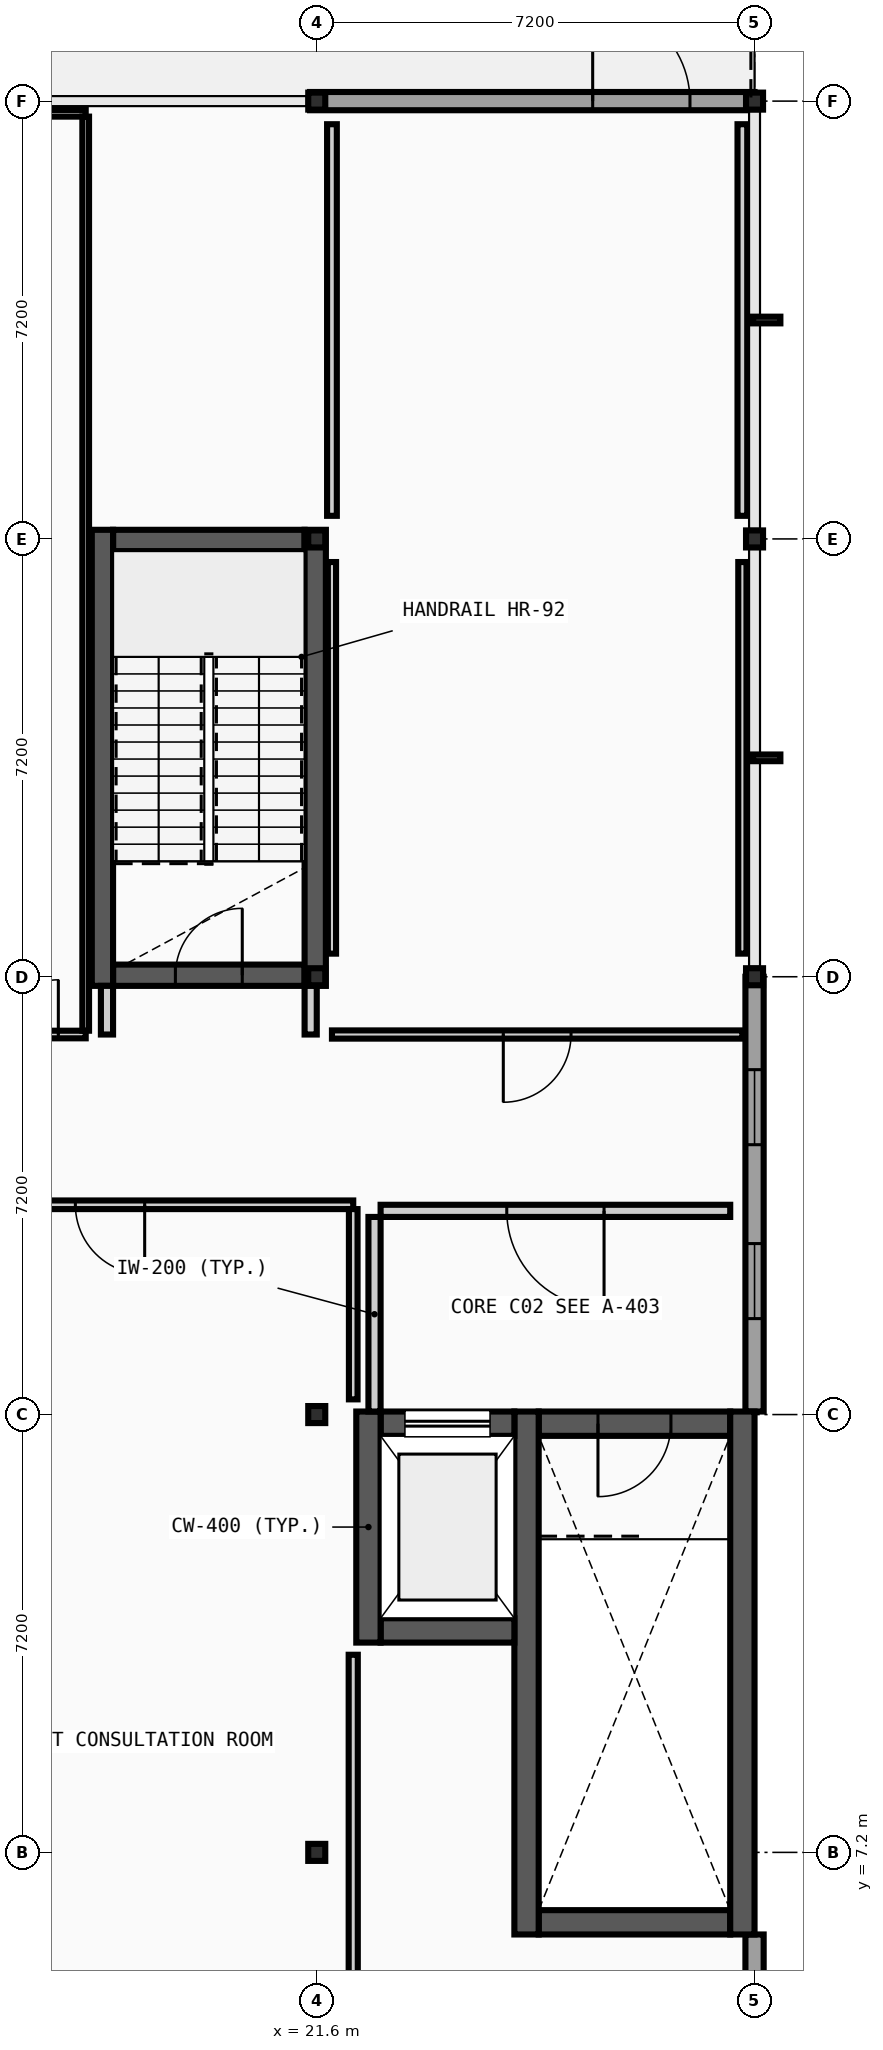
"""IFC4 building model, lengths in metres.
Left out: names, types, materials, properties, quantities, classifications, styles, units other than length and angle.
Written with IfcOpenShell. Run it as: python <this file> out.ifc"""

import sys

from ifc_helpers import new_model, si_unit, direction, frame, frame_2d, origin, origin_2d, place, context, subcontext, project, spatial, rectangle, i_section, extrude, element, fill, save


model = new_model("IFC4")
c1 = context("Model", 3, precision=1e-05, world=origin(), true_north=direction((0.0, 1.0)))
c2 = subcontext(c1, "Body", "Model", "MODEL_VIEW")
j1 = project(units=[si_unit("LENGTHUNIT", "METRE"), si_unit("PLANEANGLEUNIT", "RADIAN")], contexts=[c1])
p1 = place(None, origin())
s1 = spatial("IfcSite", under=j1, at=p1, CompositionType="ELEMENT")
p2 = place(p1, origin())
s2 = spatial("IfcBuilding", under=s1, at=p2, CompositionType="ELEMENT")
p3 = place(p2, frame((0.0, 0.0, 27.2)))
s3 = spatial("IfcBuildingStorey", under=s2, at=p3, CompositionType="ELEMENT", Elevation=27.2)
for number, where, z_axis, x_axis in (
    (1, (21.6, 7.2, 0.0), (0.0, 0.0, 1.0), (1.0, 0.0, 0.0)),
    (2, (21.6, 14.4, 0.0), (0.0, 0.0, 1.0), (1.0, 0.0, 0.0)),
    (3, (21.6, 21.6, 0.0), (0.0, 0.0, 1.0), (1.0, 0.0, 0.0)),
    (4, (21.6, 28.8, 0.0), (0.0, 0.0, 1.0), (1.0, 0.0, 0.0)),
    (5, (21.6, 36.0, 0.0), (0.0, 0.0, 1.0), (1.0, 0.0, 0.0)),
    (6, (28.8, 21.6, 0.0), (0.0, 0.0, 1.0), (1.0, 0.0, 0.0)),
    (7, (28.8, 28.8, 0.0), (0.0, 0.0, 1.0), (1.0, 0.0, 0.0)),
    (8, (28.8, 36.0, 0.0), (0.0, 0.0, 1.0), (1.0, 0.0, 0.0)),
):
    element("IfcColumn", number, at=place(p3, frame(where, z_axis=z_axis, x_axis=x_axis)), inside=s3, PredefinedType="COLUMN", context=c2, shape_type="SweptSolid", body=[
        extrude(i_section(OverallWidth=0.28, OverallDepth=0.28, WebThickness=0.01, FlangeThickness=0.018, FilletRadius=0.024, at=origin_2d()), origin(), (0.0, 0.0, 1.0), 4.4),
    ])
p4 = place(p3, frame((28.8, 36.0, 0.0), z_axis=(0.0, 0.0, 1.0), x_axis=(-1.0, 0.0, 0.0)))
e9 = element("IfcWall", 9, at=p4, inside=s3, PredefinedType="STANDARD", context=c2, shape_type="SweptSolid", body=[
    extrude(rectangle(XDim=7.31, YDim=0.3, at=frame_2d((3.655, 0.0))), origin(), (0.0, 0.0, 1.0), 4.035),
])
p5 = place(p4, frame((1.062, 0.0, 0.0)))
e10 = element("IfcOpeningElement", 10, at=p5, cuts=e9, PredefinedType="OPENING", context=c2, shape_type="SweptSolid", body=[
    extrude(rectangle(XDim=1.6, YDim=2.2, at=frame_2d((0.8, 1.1))), frame((0.0, 0.16, 0.0), z_axis=(0.0, -1.0, 0.0), x_axis=(1.0, 0.0, 0.0)), (0.0, 0.0, 1.0), 0.32),
])
p6 = place(p3, frame((28.8, -0.15, 0.0), z_axis=(0.0, 0.0, 1.0), x_axis=(0.0, 1.0, 0.0)))
e11 = element("IfcWall", 11, at=p6, inside=s3, PredefinedType="STANDARD", context=c2, shape_type="SweptSolid", body=[
    extrude(rectangle(XDim=6.0, YDim=0.3, at=frame_2d((3.0, 0.0))), origin(), (0.0, 0.0, 1.0), 4.18),
])
p7 = place(p6, frame((2.4, 0.0, 0.95)))
e12 = element("IfcOpeningElement", 12, at=p7, cuts=e11, PredefinedType="OPENING", context=c2, shape_type="SweptSolid", body=[
    extrude(rectangle(XDim=1.2, YDim=1.26, at=frame_2d((0.6, 0.63))), frame((0.0, 0.16, 0.0), z_axis=(0.0, -1.0, 0.0), x_axis=(1.0, 0.0, 0.0)), (0.0, 0.0, 1.0), 0.32),
])
p8 = place(p3, frame((28.8, 14.45, 0.0), z_axis=(0.0, 0.0, 1.0), x_axis=(0.0, 1.0, 0.0)))
e13 = element("IfcWall", 13, at=p8, inside=s3, PredefinedType="STANDARD", context=c2, shape_type="SweptSolid", body=[
    extrude(rectangle(XDim=7.15, YDim=0.3, at=frame_2d((3.575, 0.0))), origin(), (0.0, 0.0, 1.0), 4.18),
])
p9 = place(p8, frame((1.528, 0.0, 0.95)))
e14 = element("IfcOpeningElement", 14, at=p9, cuts=e13, PredefinedType="OPENING", context=c2, shape_type="SweptSolid", body=[
    extrude(rectangle(XDim=1.234, YDim=1.26, at=frame_2d((0.617, 0.63))), frame((0.0, 0.16, 0.0), z_axis=(0.0, -1.0, 0.0), x_axis=(1.0, 0.0, 0.0)), (0.0, 0.0, 1.0), 0.32),
])
p10 = place(p8, frame((4.388, 0.0, 0.95)))
e15 = element("IfcOpeningElement", 15, at=p10, cuts=e13, PredefinedType="OPENING", context=c2, shape_type="SweptSolid", body=[
    extrude(rectangle(XDim=1.234, YDim=1.26, at=frame_2d((0.617, 0.63))), frame((0.0, 0.16, 0.0), z_axis=(0.0, -1.0, 0.0), x_axis=(1.0, 0.0, 0.0)), (0.0, 0.0, 1.0), 0.32),
])
p11 = place(p3, frame((25.25, 6.05, 0.0), z_axis=(0.0, 0.0, 1.0), x_axis=(1.0, 0.0, 0.0)))
e16 = element("IfcWall", 16, at=p11, inside=s3, PredefinedType="SHEAR", context=c2, shape_type="SweptSolid", body=[
    extrude(rectangle(XDim=3.15, YDim=0.4, at=frame_2d((1.575, 0.0))), origin(), (0.0, 0.0, 1.0), 4.18),
])
p12 = place(p3, frame((25.25, 14.25, 0.0), z_axis=(0.0, 0.0, 1.0), x_axis=(1.0, 0.0, 0.0)))
e17 = element("IfcWall", 17, at=p12, inside=s3, PredefinedType="SHEAR", context=c2, shape_type="SweptSolid", body=[
    extrude(rectangle(XDim=3.15, YDim=0.4, at=frame_2d((1.575, 0.0))), origin(), (0.0, 0.0, 1.0), 4.18),
])
p13 = place(p12, frame((0.975, 0.0, 0.0)))
e18 = element("IfcOpeningElement", 18, at=p13, cuts=e17, PredefinedType="OPENING", context=c2, shape_type="SweptSolid", body=[
    extrude(rectangle(XDim=1.2, YDim=2.15, at=frame_2d((0.6, 1.075))), frame((0.0, 0.21, 0.0), z_axis=(0.0, -1.0, 0.0), x_axis=(1.0, 0.0, 0.0)), (0.0, 0.0, 1.0), 0.42),
])
for number, where, z_axis, x_axis in (
    (19, (25.05, 5.85, 0.0), (0.0, 0.0, 1.0), (0.0, 1.0, 0.0)),
    (20, (28.6, 5.85, 0.0), (0.0, 0.0, 1.0), (0.0, 1.0, 0.0)),
):
    element("IfcWall", number, at=place(p3, frame(where, z_axis=z_axis, x_axis=x_axis)), inside=s3, PredefinedType="SHEAR", context=c2, shape_type="SweptSolid", body=[
        extrude(rectangle(XDim=8.6, YDim=0.4, at=frame_2d((4.3, 0.0))), origin(), (0.0, 0.0, 1.0), 4.18),
    ])
p14 = place(p3, frame((22.65, 10.85, 0.0), z_axis=(0.0, 0.0, 1.0), x_axis=(1.0, 0.0, 0.0)))
e21 = element("IfcWall", 21, at=p14, inside=s3, PredefinedType="SHEAR", context=c2, shape_type="SweptSolid", body=[
    extrude(rectangle(XDim=2.2, YDim=0.4, at=frame_2d((1.1, 0.0))), origin(), (0.0, 0.0, 1.0), 4.18),
])
p15 = place(p3, frame((22.65, 14.25, 0.0), z_axis=(0.0, 0.0, 1.0), x_axis=(1.0, 0.0, 0.0)))
e22 = element("IfcWall", 22, at=p15, inside=s3, PredefinedType="SHEAR", context=c2, shape_type="SweptSolid", body=[
    extrude(rectangle(XDim=2.2, YDim=0.4, at=frame_2d((1.1, 0.0))), origin(), (0.0, 0.0, 1.0), 4.18),
])
p16 = place(p15, frame((0.4, 0.0, 0.0)))
e23 = element("IfcOpeningElement", 23, at=p16, cuts=e22, PredefinedType="OPENING", context=c2, shape_type="SweptSolid", body=[
    extrude(rectangle(XDim=1.4, YDim=2.2, at=frame_2d((0.7, 1.1))), frame((0.0, 0.21, 0.0), z_axis=(0.0, -1.0, 0.0), x_axis=(1.0, 0.0, 0.0)), (0.0, 0.0, 1.0), 0.42),
])
p17 = place(p3, frame((22.45, 10.65, 0.0), z_axis=(0.0, 0.0, 1.0), x_axis=(0.0, 1.0, 0.0)))
e24 = element("IfcWall", 24, at=p17, inside=s3, PredefinedType="SHEAR", context=c2, shape_type="SweptSolid", body=[
    extrude(rectangle(XDim=3.8, YDim=0.4, at=frame_2d((1.9, 0.0))), origin(), (0.0, 0.0, 1.0), 4.18),
])
p18 = place(p3, frame((22.65, 17.75, 0.0), z_axis=(0.0, 0.0, 1.0), x_axis=(1.0, 0.0, 0.0)))
e25 = element("IfcWall", 25, at=p18, inside=s3, PredefinedType="PARTITIONING", context=c2, shape_type="SweptSolid", body=[
    extrude(rectangle(XDim=5.75, YDim=0.2, at=frame_2d((2.875, 0.0))), origin(), (0.0, 0.0, 1.0), 4.18),
])
p19 = place(p18, frame((2.075, 0.0, 0.0)))
e26 = element("IfcOpeningElement", 26, at=p19, cuts=e25, PredefinedType="OPENING", context=c2, shape_type="SweptSolid", body=[
    extrude(rectangle(XDim=1.6, YDim=2.2, at=frame_2d((0.8, 1.1))), frame((0.0, 0.11, 0.0), z_axis=(0.0, -1.0, 0.0), x_axis=(1.0, 0.0, 0.0)), (0.0, 0.0, 1.0), 0.22),
])
p20 = place(p3, frame((22.55, 14.45, 0.0), z_axis=(0.0, 0.0, 1.0), x_axis=(0.0, 1.0, 0.0)))
e27 = element("IfcWall", 27, at=p20, inside=s3, PredefinedType="PARTITIONING", context=c2, shape_type="SweptSolid", body=[
    extrude(rectangle(XDim=3.2, YDim=0.2, at=frame_2d((1.6, 0.0))), origin(), (0.0, 0.0, 1.0), 4.18),
])
p21 = place(p3, frame((18.25, 21.625, 0.0), z_axis=(0.0, 0.0, 1.0), x_axis=(1.0, 0.0, 0.0)))
e28 = element("IfcWall", 28, at=p21, inside=s3, PredefinedType="SHEAR", context=c2, shape_type="SweptSolid", body=[
    extrude(rectangle(XDim=3.15, YDim=0.35, at=frame_2d((1.575, 0.0))), origin(), (0.0, 0.0, 1.0), 4.2),
])
p22 = place(p21, frame((1.025, 0.0, 0.0)))
e29 = element("IfcOpeningElement", 29, at=p22, cuts=e28, PredefinedType="OPENING", context=c2, shape_type="SweptSolid", body=[
    extrude(rectangle(XDim=1.1, YDim=2.15, at=frame_2d((0.55, 1.075))), frame((0.0, 0.185, 0.0), z_axis=(0.0, -1.0, 0.0), x_axis=(1.0, 0.0, 0.0)), (0.0, 0.0, 1.0), 0.37),
])
p23 = place(p3, frame((18.25, 28.775, 0.0), z_axis=(0.0, 0.0, 1.0), x_axis=(1.0, 0.0, 0.0)))
e30 = element("IfcWall", 30, at=p23, inside=s3, PredefinedType="SHEAR", context=c2, shape_type="SweptSolid", body=[
    extrude(rectangle(XDim=3.15, YDim=0.35, at=frame_2d((1.575, 0.0))), origin(), (0.0, 0.0, 1.0), 4.2),
])
for number, where, z_axis, x_axis in (
    (31, (18.075, 21.45, 0.0), (0.0, 0.0, 1.0), (0.0, 1.0, 0.0)),
    (32, (21.575, 21.45, 0.0), (0.0, 0.0, 1.0), (0.0, 1.0, 0.0)),
):
    element("IfcWall", number, at=place(p3, frame(where, z_axis=z_axis, x_axis=x_axis)), inside=s3, PredefinedType="SHEAR", context=c2, shape_type="SweptSolid", body=[
        extrude(rectangle(XDim=7.5, YDim=0.35, at=frame_2d((3.75, 0.0))), origin(), (0.0, 0.0, 1.0), 4.2),
    ])
for number, where, z_axis, x_axis in (
    (33, (18.15, 20.65, 0.0), (0.0, 0.0, 1.0), (0.0, 1.0, 0.0)),
    (34, (21.5, 20.65, 0.0), (0.0, 0.0, 1.0), (0.0, 1.0, 0.0)),
):
    element("IfcWall", number, at=place(p3, frame(where, z_axis=z_axis, x_axis=x_axis)), inside=s3, PredefinedType="PARTITIONING", context=c2, shape_type="SweptSolid", body=[
        extrude(rectangle(XDim=0.8, YDim=0.2, at=frame_2d((0.4, 0.0))), origin(), (0.0, 0.0, 1.0), 3.85),
    ])
p24 = place(p3, frame((9.45, 17.85, 0.0), z_axis=(0.0, 0.0, 1.0), x_axis=(1.0, 0.0, 0.0)))
e35 = element("IfcWall", 35, at=p24, inside=s3, PredefinedType="PARTITIONING", context=c2, shape_type="SweptSolid", body=[
    extrude(rectangle(XDim=12.75, YDim=0.142, at=frame_2d((6.375, 0.0))), origin(), (0.0, 0.0, 1.0), 4.18),
])
p25 = place(p24, frame((0.45, 0.0, 0.0)))
e36 = element("IfcOpeningElement", 36, at=p25, cuts=e35, PredefinedType="OPENING", context=c2, shape_type="SweptSolid", body=[
    extrude(rectangle(XDim=1.8, YDim=2.3, at=frame_2d((0.9, 1.15))), frame((0.0, 0.081, 0.0), z_axis=(0.0, -1.0, 0.0), x_axis=(1.0, 0.0, 0.0)), (0.0, 0.0, 1.0), 0.162),
])
p26 = place(p24, frame((8.18, 0.0, 0.0)))
e37 = element("IfcOpeningElement", 37, at=p26, cuts=e35, PredefinedType="OPENING", context=c2, shape_type="SweptSolid", body=[
    extrude(rectangle(XDim=1.14, YDim=2.096, at=frame_2d((0.57, 1.048))), frame((0.0, 0.081, 0.0), z_axis=(0.0, -1.0, 0.0), x_axis=(1.0, 0.0, 0.0)), (0.0, 0.0, 1.0), 0.162),
])
p27 = place(p3, frame((14.7, 20.65, 0.0), z_axis=(0.0, 0.0, 1.0), x_axis=(1.0, 0.0, 0.0)))
e38 = element("IfcWall", 38, at=p27, inside=s3, PredefinedType="PARTITIONING", context=c2, shape_type="SweptSolid", body=[
    extrude(rectangle(XDim=3.1, YDim=0.125, at=frame_2d((1.55, 0.0))), origin(), (0.0, 0.0, 1.0), 4.18),
])
p28 = place(p27, frame((1.75, 0.0, 0.0)))
e39 = element("IfcOpeningElement", 39, at=p28, cuts=e38, PredefinedType="OPENING", context=c2, shape_type="SweptSolid", body=[
    extrude(rectangle(XDim=0.9, YDim=2.1, at=frame_2d((0.45, 1.05))), frame((0.0, 0.073, 0.0), z_axis=(0.0, -1.0, 0.0), x_axis=(1.0, 0.0, 0.0)), (0.0, 0.0, 1.0), 0.145),
])
p29 = place(p3, frame((21.85, 20.65, 0.0), z_axis=(0.0, 0.0, 1.0), x_axis=(1.0, 0.0, 0.0)))
e40 = element("IfcWall", 40, at=p29, inside=s3, PredefinedType="PARTITIONING", context=c2, shape_type="SweptSolid", body=[
    extrude(rectangle(XDim=6.75, YDim=0.135, at=frame_2d((3.375, 0.0))), origin(), (0.0, 0.0, 1.0), 4.18),
])
p30 = place(p29, frame((2.818, 0.0, 0.0)))
e41 = element("IfcOpeningElement", 41, at=p30, cuts=e40, PredefinedType="OPENING", context=c2, shape_type="SweptSolid", body=[
    extrude(rectangle(XDim=1.114, YDim=2.096, at=frame_2d((0.557, 1.048))), frame((0.0, 0.078, 0.0), z_axis=(0.0, -1.0, 0.0), x_axis=(1.0, 0.0, 0.0)), (0.0, 0.0, 1.0), 0.155),
])
p31 = place(p3, frame((14.78, 35.8, 0.0), z_axis=(0.0, 0.0, 1.0), x_axis=(1.0, 0.0, 0.0)))
e42 = element("IfcWall", 42, at=p31, inside=s3, PredefinedType="PARTITIONING", context=c2, shape_type="SweptSolid", body=[
    extrude(rectangle(XDim=3.02, YDim=0.11, at=frame_2d((1.51, 0.0))), origin(), (0.0, 0.0, 1.0), 4.035),
])
p32 = place(p3, frame((17.8, 20.712, 0.0), z_axis=(0.0, 0.0, 1.0), x_axis=(0.0, 1.0, 0.0)))
e43 = element("IfcWall", 43, at=p32, inside=s3, PredefinedType="PARTITIONING", context=c2, shape_type="SweptSolid", body=[
    extrude(rectangle(XDim=15.033, YDim=0.11, at=frame_2d((7.516, 0.0))), origin(), (0.0, 0.0, 1.0), 4.18),
])
p33 = place(p3, frame((21.85, 21.98, 0.0), z_axis=(0.0, 0.0, 1.0), x_axis=(0.0, 1.0, 0.0)))
e44 = element("IfcWall", 44, at=p33, inside=s3, PredefinedType="PARTITIONING", context=c2, shape_type="SweptSolid", body=[
    extrude(rectangle(XDim=6.44, YDim=0.135, at=frame_2d((3.22, 0.0))), origin(), (0.0, 0.0, 1.0), 4.18),
])
p34 = place(p3, frame((21.85, 29.18, 0.0), z_axis=(0.0, 0.0, 1.0), x_axis=(0.0, 1.0, 0.0)))
e45 = element("IfcWall", 45, at=p34, inside=s3, PredefinedType="PARTITIONING", context=c2, shape_type="SweptSolid", body=[
    extrude(rectangle(XDim=6.44, YDim=0.16, at=frame_2d((3.22, 0.0))), origin(), (0.0, 0.0, 1.0), 4.18),
])
p35 = place(p3, frame((22.2, 0.2, 0.0), z_axis=(0.0, 0.0, 1.0), x_axis=(0.0, 1.0, 0.0)))
e46 = element("IfcWall", 46, at=p35, inside=s3, PredefinedType="PARTITIONING", context=c2, shape_type="SweptSolid", body=[
    extrude(rectangle(XDim=10.25, YDim=0.15, at=frame_2d((5.125, 0.0))), origin(), (0.0, 0.0, 1.0), 4.18),
])
p36 = place(p3, frame((22.2, 14.65, 0.0), z_axis=(0.0, 0.0, 1.0), x_axis=(0.0, 1.0, 0.0)))
e47 = element("IfcWall", 47, at=p36, inside=s3, PredefinedType="PARTITIONING", context=c2, shape_type="SweptSolid", body=[
    extrude(rectangle(XDim=3.129, YDim=0.142, at=frame_2d((1.564, 0.0))), origin(), (0.0, 0.0, 1.0), 4.18),
])
p37 = place(p3, frame((28.6, 21.98, 0.0), z_axis=(0.0, 0.0, 1.0), x_axis=(0.0, 1.0, 0.0)))
e48 = element("IfcWall", 48, at=p37, inside=s3, PredefinedType="PARTITIONING", context=c2, shape_type="SweptSolid", body=[
    extrude(rectangle(XDim=6.44, YDim=0.135, at=frame_2d((3.22, 0.0))), origin(), (0.0, 0.0, 1.0), 4.11),
])
p38 = place(p3, frame((28.6, 29.18, 0.0), z_axis=(0.0, 0.0, 1.0), x_axis=(0.0, 1.0, 0.0)))
e49 = element("IfcWall", 49, at=p38, inside=s3, PredefinedType="PARTITIONING", context=c2, shape_type="SweptSolid", body=[
    extrude(rectangle(XDim=6.44, YDim=0.16, at=frame_2d((3.22, 0.0))), origin(), (0.0, 0.0, 1.0), 4.11),
])
p39 = place(p9, origin())
e50 = element("IfcWindow", 50, at=p39, inside=s3, PartitioningType="SINGLE_PANEL", PredefinedType="WINDOW", context=c2, shape_type="SweptSolid", body=[
    extrude(rectangle(XDim=1.234, YDim=1.26, at=frame_2d((0.617, 0.63))), frame((0.0, 0.03, 0.0), z_axis=(0.0, -1.0, 0.0), x_axis=(1.0, 0.0, 0.0)), (0.0, 0.0, 1.0), 0.06),
])
fill(e14, e50)
p40 = place(p10, origin())
e51 = element("IfcWindow", 51, at=p40, inside=s3, PartitioningType="SINGLE_PANEL", PredefinedType="WINDOW", context=c2, shape_type="SweptSolid", body=[
    extrude(rectangle(XDim=1.234, YDim=1.26, at=frame_2d((0.617, 0.63))), frame((0.0, 0.03, 0.0), z_axis=(0.0, -1.0, 0.0), x_axis=(1.0, 0.0, 0.0)), (0.0, 0.0, 1.0), 0.06),
])
fill(e15, e51)
p41 = place(p5, origin())
e52 = element("IfcDoor", 52, at=p41, inside=s3, OperationType="DOUBLE_DOOR_SINGLE_SWING", PredefinedType="DOOR", context=c2, shape_type="SweptSolid", body=[
    extrude(rectangle(XDim=1.6, YDim=2.2, at=frame_2d((0.8, 1.1))), frame((0.0, 0.025, 0.0), z_axis=(0.0, -1.0, 0.0), x_axis=(1.0, 0.0, 0.0)), (0.0, 0.0, 1.0), 0.05),
])
fill(e10, e52)
p42 = place(p13, frame((1.2, 0.0, 0.0), z_axis=(0.0, 0.0, 1.0), x_axis=(-1.0, 0.0, 0.0)))
e53 = element("IfcDoor", 53, at=p42, inside=s3, OperationType="SINGLE_SWING_LEFT", PredefinedType="DOOR", context=c2, shape_type="SweptSolid", body=[
    extrude(rectangle(XDim=1.2, YDim=2.15, at=frame_2d((0.6, 1.075))), frame((0.0, 0.025, 0.0), z_axis=(0.0, -1.0, 0.0), x_axis=(1.0, 0.0, 0.0)), (0.0, 0.0, 1.0), 0.05),
])
fill(e18, e53)
p43 = place(p16, origin())
e54 = element("IfcDoor", 54, at=p43, inside=s3, OperationType="SLIDING_TO_LEFT", PredefinedType="DOOR", context=c2, shape_type="SweptSolid", body=[
    extrude(rectangle(XDim=1.4, YDim=2.2, at=frame_2d((0.7, 1.1))), frame((0.0, 0.025, 0.0), z_axis=(0.0, -1.0, 0.0), x_axis=(1.0, 0.0, 0.0)), (0.0, 0.0, 1.0), 0.05),
])
fill(e23, e54)
p44 = place(p19, origin())
e55 = element("IfcDoor", 55, at=p44, inside=s3, OperationType="DOUBLE_DOOR_SINGLE_SWING", PredefinedType="DOOR", context=c2, shape_type="SweptSolid", body=[
    extrude(rectangle(XDim=1.6, YDim=2.2, at=frame_2d((0.8, 1.1))), frame((0.0, 0.025, 0.0), z_axis=(0.0, -1.0, 0.0), x_axis=(1.0, 0.0, 0.0)), (0.0, 0.0, 1.0), 0.05),
])
fill(e26, e55)
p45 = place(p22, frame((1.1, 0.0, 0.0), z_axis=(0.0, 0.0, 1.0), x_axis=(-1.0, 0.0, 0.0)))
e56 = element("IfcDoor", 56, at=p45, inside=s3, OperationType="SINGLE_SWING_RIGHT", PredefinedType="DOOR", context=c2, shape_type="SweptSolid", body=[
    extrude(rectangle(XDim=1.1, YDim=2.15, at=frame_2d((0.55, 1.075))), frame((0.0, 0.025, 0.0), z_axis=(0.0, -1.0, 0.0), x_axis=(1.0, 0.0, 0.0)), (0.0, 0.0, 1.0), 0.05),
])
fill(e29, e56)
p46 = place(p28, frame((0.9, 0.0, 0.0), z_axis=(0.0, 0.0, 1.0), x_axis=(-1.0, 0.0, 0.0)))
e57 = element("IfcDoor", 57, at=p46, inside=s3, OperationType="SINGLE_SWING_RIGHT", PredefinedType="DOOR", context=c2, shape_type="SweptSolid", body=[
    extrude(rectangle(XDim=0.9, YDim=2.1, at=frame_2d((0.45, 1.05))), frame((0.0, 0.025, 0.0), z_axis=(0.0, -1.0, 0.0), x_axis=(1.0, 0.0, 0.0)), (0.0, 0.0, 1.0), 0.05),
])
fill(e39, e57)
p47 = place(p30, frame((1.114, 0.0, 0.0), z_axis=(0.0, 0.0, 1.0), x_axis=(-1.0, 0.0, 0.0)))
e58 = element("IfcDoor", 58, at=p47, inside=s3, OperationType="SINGLE_SWING_LEFT", PredefinedType="DOOR", context=c2, shape_type="SweptSolid", body=[
    extrude(rectangle(XDim=1.114, YDim=2.096, at=frame_2d((0.557, 1.048))), frame((0.0, 0.025, 0.0), z_axis=(0.0, -1.0, 0.0), x_axis=(1.0, 0.0, 0.0)), (0.0, 0.0, 1.0), 0.05),
])
fill(e41, e58)
p48 = place(p26, origin())
e59 = element("IfcDoor", 59, at=p48, inside=s3, OperationType="SINGLE_SWING_RIGHT", PredefinedType="DOOR", context=c2, shape_type="SweptSolid", body=[
    extrude(rectangle(XDim=1.14, YDim=2.096, at=frame_2d((0.57, 1.048))), frame((0.0, 0.025, 0.0), z_axis=(0.0, -1.0, 0.0), x_axis=(1.0, 0.0, 0.0)), (0.0, 0.0, 1.0), 0.05),
])
fill(e37, e59)
save(model, sys.argv[1])
